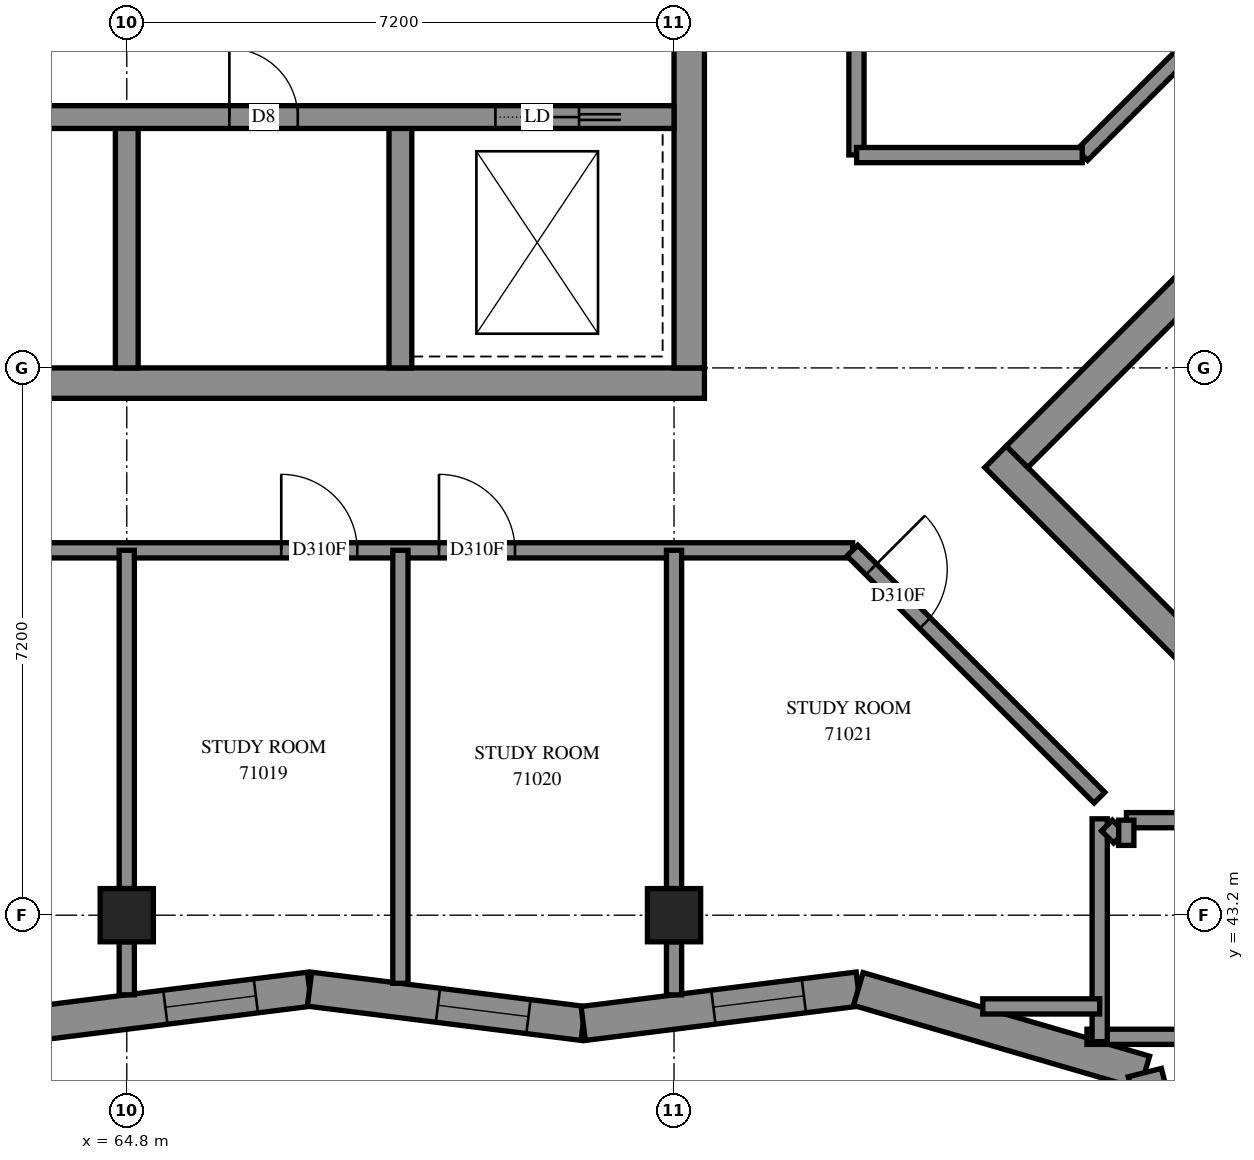
"""IFC4 building model, lengths in metres.
Left out: names, types, materials, properties, quantities, classifications, styles, units other than length and angle.
Written with IfcOpenShell. Run it as: python <this file> out.ifc"""

import sys

from ifc_helpers import new_model, si_unit, direction, frame, frame_2d, origin, origin_2d, place, context, subcontext, project, spatial, polyline, rectangle, outline, extrude, element, fill, save


model = new_model("IFC4")
c1 = context("Model", 3, precision=1e-05, world=origin(), true_north=direction((0.0, 1.0)))
c2 = subcontext(c1, "Body", "Model", "MODEL_VIEW")
j1 = project(units=[si_unit("LENGTHUNIT", "METRE"), si_unit("PLANEANGLEUNIT", "RADIAN")], contexts=[c1])
p1 = place(None, origin())
s1 = spatial("IfcSite", under=j1, at=p1, CompositionType="ELEMENT")
p2 = place(p1, origin())
s2 = spatial("IfcBuilding", under=s1, at=p2, CompositionType="ELEMENT")
p3 = place(p2, frame((0.0, 0.0, 260.8)))
s3 = spatial("IfcBuildingStorey", under=s2, at=p3, CompositionType="ELEMENT", Elevation=260.8)
for number, where, z_axis, x_axis in (
    (1, (64.8, 43.2, 0.0), (0.0, 0.0, 1.0), (1.0, 0.0, 0.0)),
    (2, (72.0, 43.2, 0.0), (0.0, 0.0, 1.0), (1.0, 0.0, 0.0)),
):
    element("IfcColumn", number, at=place(p3, frame(where, z_axis=z_axis, x_axis=x_axis)), inside=s3, PredefinedType="COLUMN", context=c2, shape_type="SweptSolid", body=[
        extrude(rectangle(XDim=0.7, YDim=0.7, at=origin_2d()), origin(), (0.0, 0.0, 1.0), 3.1),
    ])
p4 = place(p3, frame((57.2, 50.2, -0.3), z_axis=(0.0, 0.0, 1.0), x_axis=(1.0, 0.0, 0.0)))
e3 = element("IfcWall", 3, at=p4, inside=s3, PredefinedType="SHEAR", context=c2, shape_type="SweptSolid", body=[
    extrude(rectangle(XDim=15.2, YDim=0.4, at=frame_2d((7.6, 0.0))), origin(), (0.0, 0.0, 1.0), 2.7),
])
p5 = place(p3, frame((72.2, 50.4, -0.3), z_axis=(0.0, 0.0, 1.0), x_axis=(0.0, 1.0, 0.0)))
e4 = element("IfcWall", 4, at=p5, inside=s3, PredefinedType="SHEAR", context=c2, shape_type="SweptSolid", body=[
    extrude(rectangle(XDim=14.4, YDim=0.4, at=frame_2d((7.2, 0.0))), origin(), (0.0, 0.0, 1.0), 2.7),
])
p6 = place(p5, frame((4.55, 0.0, 0.3)))
e5 = element("IfcOpeningElement", 5, at=p6, cuts=e4, PredefinedType="OPENING", context=c2, shape_type="SweptSolid", body=[
    extrude(rectangle(XDim=1.1, YDim=2.1, at=frame_2d((0.55, 1.05))), frame((0.0, 0.21, 0.0), z_axis=(0.0, -1.0, 0.0), x_axis=(1.0, 0.0, 0.0)), (0.0, 0.0, 1.0), 0.42),
])
p7 = place(p5, frame((11.35, 0.0, 0.3)))
e6 = element("IfcOpeningElement", 6, at=p7, cuts=e4, PredefinedType="OPENING", context=c2, shape_type="SweptSolid", body=[
    extrude(rectangle(XDim=1.1, YDim=2.1, at=frame_2d((0.55, 1.05))), frame((0.0, 0.21, 0.0), z_axis=(0.0, -1.0, 0.0), x_axis=(1.0, 0.0, 0.0)), (0.0, 0.0, 1.0), 0.42),
])
for number, where, z_axis, x_axis in (
    (7, (64.8, 50.4, 0.0), (0.0, 0.0, 1.0), (0.0, 1.0, 0.0)),
    (8, (68.4, 50.4, 0.0), (0.0, 0.0, 1.0), (0.0, 1.0, 0.0)),
):
    element("IfcWall", number, at=place(p3, frame(where, z_axis=z_axis, x_axis=x_axis)), inside=s3, PredefinedType="SOLIDWALL", context=c2, shape_type="SweptSolid", body=[
        extrude(rectangle(XDim=3.3, YDim=0.3, at=frame_2d((1.65, 0.0))), origin(), (0.0, 0.0, 1.0), 3.1),
    ])
p8 = place(p3, frame((57.6, 53.7, 0.0), z_axis=(0.0, 0.0, 1.0), x_axis=(1.0, 0.0, 0.0)))
e9 = element("IfcWall", 9, at=p8, inside=s3, PredefinedType="SOLIDWALL", context=c2, shape_type="SweptSolid", body=[
    extrude(rectangle(XDim=14.4, YDim=0.3, at=frame_2d((7.2, 0.0))), origin(), (0.0, 0.0, 1.0), 3.1),
])
p9 = place(p8, frame((1.35, 0.0, 0.0)))
e10 = element("IfcOpeningElement", 10, at=p9, cuts=e9, PredefinedType="OPENING", context=c2, shape_type="SweptSolid", body=[
    extrude(rectangle(XDim=0.9, YDim=2.1, at=frame_2d((0.45, 1.05))), frame((0.0, 0.16, 0.0), z_axis=(0.0, -1.0, 0.0), x_axis=(1.0, 0.0, 0.0)), (0.0, 0.0, 1.0), 0.32),
])
p10 = place(p8, frame((4.95, 0.0, 0.0)))
e11 = element("IfcOpeningElement", 11, at=p10, cuts=e9, PredefinedType="OPENING", context=c2, shape_type="SweptSolid", body=[
    extrude(rectangle(XDim=0.9, YDim=2.1, at=frame_2d((0.45, 1.05))), frame((0.0, 0.16, 0.0), z_axis=(0.0, -1.0, 0.0), x_axis=(1.0, 0.0, 0.0)), (0.0, 0.0, 1.0), 0.32),
])
p11 = place(p8, frame((8.55, 0.0, 0.0)))
e12 = element("IfcOpeningElement", 12, at=p11, cuts=e9, PredefinedType="OPENING", context=c2, shape_type="SweptSolid", body=[
    extrude(rectangle(XDim=0.9, YDim=2.1, at=frame_2d((0.45, 1.05))), frame((0.0, 0.16, 0.0), z_axis=(0.0, -1.0, 0.0), x_axis=(1.0, 0.0, 0.0)), (0.0, 0.0, 1.0), 0.32),
])
p12 = place(p8, frame((12.05, 0.0, 0.0)))
e13 = element("IfcOpeningElement", 13, at=p12, cuts=e9, PredefinedType="OPENING", context=c2, shape_type="SweptSolid", body=[
    extrude(rectangle(XDim=1.1, YDim=2.1, at=frame_2d((0.55, 1.05))), frame((0.0, 0.16, 0.0), z_axis=(0.0, -1.0, 0.0), x_axis=(1.0, 0.0, 0.0)), (0.0, 0.0, 1.0), 0.32),
])
p13 = place(p3, frame((76.23, 49.231, -0.3), z_axis=(0.0, 0.0, 1.0), x_axis=(0.7071034917, -0.7071100706, 0.0)))
e14 = element("IfcWall", 14, at=p13, inside=s3, PredefinedType="SHEAR", context=c2, shape_type="SweptSolid", body=[
    extrude(rectangle(XDim=15.2, YDim=0.4, at=frame_2d((7.6, 0.0))), origin(), (0.0, 0.0, 1.0), 2.7),
])
p14 = place(p3, frame((76.513, 49.231, -0.3), z_axis=(0.0, 0.0, 1.0), x_axis=(0.7071067812, 0.7071067812, 0.0)))
e15 = element("IfcWall", 15, at=p14, inside=s3, PredefinedType="SHEAR", context=c2, shape_type="SweptSolid", body=[
    extrude(rectangle(XDim=14.4, YDim=0.4, at=frame_2d((7.2, 0.0))), origin(), (0.0, 0.0, 1.0), 2.7),
])
p15 = place(p14, frame((4.55, 0.0, 0.3)))
e16 = element("IfcOpeningElement", 16, at=p15, cuts=e15, PredefinedType="OPENING", context=c2, shape_type="SweptSolid", body=[
    extrude(rectangle(XDim=1.1, YDim=2.1, at=frame_2d((0.55, 1.05))), frame((0.0, 0.21, 0.0), z_axis=(0.0, -1.0, 0.0), x_axis=(1.0, 0.0, 0.0)), (0.0, 0.0, 1.0), 0.42),
])
p16 = place(p14, frame((11.35, 0.0, 0.3)))
e17 = element("IfcOpeningElement", 17, at=p16, cuts=e15, PredefinedType="OPENING", context=c2, shape_type="SweptSolid", body=[
    extrude(rectangle(XDim=1.1, YDim=2.1, at=frame_2d((0.55, 1.05))), frame((0.0, 0.21, 0.0), z_axis=(0.0, -1.0, 0.0), x_axis=(1.0, 0.0, 0.0)), (0.0, 0.0, 1.0), 0.42),
])
p17 = place(p3, frame((63.603, 41.776, 0.0), z_axis=(0.0, 0.0, 1.0), x_axis=(0.9922473228, 0.1242789221, 0.0)))
e18 = element("IfcWall", 18, at=p17, inside=s3, PredefinedType="SOLIDWALL", context=c2, shape_type="SweptSolid", body=[
    extrude(outline(polyline([(-0.028, -0.225), (3.601, -0.225), (3.657, 0.225), (0.028, 0.225), (-0.028, -0.225)])), origin(), (0.0, 0.0, 1.0), 3.1),
])
p18 = place(p17, frame((1.717, 0.0, 0.45)))
e19 = element("IfcOpeningElement", 19, at=p18, cuts=e18, PredefinedType="OPENING", context=c2, shape_type="SweptSolid", body=[
    extrude(rectangle(XDim=1.2, YDim=2.55, at=frame_2d((0.6, 1.275))), frame((0.0, 0.235, 0.0), z_axis=(0.0, -1.0, 0.0), x_axis=(1.0, 0.0, 0.0)), (0.0, 0.0, 1.0), 0.47),
])
p19 = place(p3, frame((67.204, 42.227, 0.0), z_axis=(0.0, 0.0, 1.0), x_axis=(0.9922477484, -0.124275524, 0.0)))
e20 = element("IfcWall", 20, at=p19, inside=s3, PredefinedType="SOLIDWALL", context=c2, shape_type="SweptSolid", body=[
    extrude(outline(polyline([(0.028, -0.225), (3.657, -0.225), (3.601, 0.225), (-0.028, 0.225), (0.028, -0.225)])), origin(), (0.0, 0.0, 1.0), 3.1),
])
p20 = place(p19, frame((1.703, 0.0, 0.45)))
e21 = element("IfcOpeningElement", 21, at=p20, cuts=e20, PredefinedType="OPENING", context=c2, shape_type="SweptSolid", body=[
    extrude(rectangle(XDim=1.2, YDim=2.55, at=frame_2d((0.6, 1.275))), frame((0.0, 0.235, 0.0), z_axis=(0.0, -1.0, 0.0), x_axis=(1.0, 0.0, 0.0)), (0.0, 0.0, 1.0), 0.47),
])
p21 = place(p3, frame((70.805, 41.776, 0.0), z_axis=(0.0, 0.0, 1.0), x_axis=(0.9922504354, 0.124254068, 0.0)))
e22 = element("IfcWall", 22, at=p21, inside=s3, PredefinedType="SOLIDWALL", context=c2, shape_type="SweptSolid", body=[
    extrude(outline(polyline([(-0.028, -0.225), (3.601, -0.225), (3.694, 0.225), (0.028, 0.225), (-0.028, -0.225)])), origin(), (0.0, 0.0, 1.0), 3.1),
])
p22 = place(p21, frame((1.726, 0.0, 0.45)))
e23 = element("IfcOpeningElement", 23, at=p22, cuts=e22, PredefinedType="OPENING", context=c2, shape_type="SweptSolid", body=[
    extrude(rectangle(XDim=1.2, YDim=2.55, at=frame_2d((0.6, 1.275))), frame((0.0, 0.235, 0.0), z_axis=(0.0, -1.0, 0.0), x_axis=(1.0, 0.0, 0.0)), (0.0, 0.0, 1.0), 0.47),
])
p23 = place(p3, frame((74.424, 42.229, 0.0), z_axis=(0.0, 0.0, 1.0), x_axis=(0.9599486399, -0.2801760317, 0.0)))
e24 = element("IfcWall", 24, at=p23, inside=s3, PredefinedType="SOLIDWALL", context=c2, shape_type="SweptSolid", body=[
    extrude(outline(polyline([(0.047, -0.225), (3.798, -0.225), (4.055, 0.225), (-0.047, 0.225), (0.047, -0.225)])), origin(), (0.0, 0.0, 1.0), 3.1),
])
p24 = place(p3, frame((78.194, 41.129, 0.0), z_axis=(0.0, 0.0, 1.0), x_axis=(0.2448760065, -0.9695544036, 0.0)))
e25 = element("IfcWall", 25, at=p24, inside=s3, PredefinedType="SOLIDWALL", context=c2, shape_type="SweptSolid", body=[
    extrude(outline(polyline([(0.129, -0.225), (4.812, -0.225), (4.555, 0.225), (-0.129, 0.225), (0.129, -0.225)])), origin(), (0.0, 0.0, 1.0), 3.1),
])
p25 = place(p24, frame((2.366, 0.0, 0.45)))
e26 = element("IfcOpeningElement", 26, at=p25, cuts=e25, PredefinedType="OPENING", context=c2, shape_type="SweptSolid", body=[
    extrude(rectangle(XDim=1.2, YDim=2.55, at=frame_2d((0.6, 1.275))), frame((0.0, 0.235, 0.0), z_axis=(0.0, -1.0, 0.0), x_axis=(1.0, 0.0, 0.0)), (0.0, 0.0, 1.0), 0.47),
])
p26 = place(p3, frame((55.2, 48.0, 0.0), z_axis=(0.0, 0.0, 1.0), x_axis=(1.0, 0.0, 0.0)))
e27 = element("IfcWall", 27, at=p26, inside=s3, PredefinedType="PARTITIONING", context=c2, shape_type="SweptSolid", body=[
    extrude(rectangle(XDim=19.15, YDim=0.2, at=frame_2d((9.575, 0.0))), origin(), (0.0, 0.0, 1.0), 3.1),
])
p27 = place(p26, frame((6.343, 0.0, 0.0)))
e28 = element("IfcOpeningElement", 28, at=p27, cuts=e27, PredefinedType="OPENING", context=c2, shape_type="SweptSolid", body=[
    extrude(rectangle(XDim=0.9, YDim=2.1, at=frame_2d((0.45, 1.05))), frame((0.0, 0.11, 0.0), z_axis=(0.0, -1.0, 0.0), x_axis=(1.0, 0.0, 0.0)), (0.0, 0.0, 1.0), 0.22),
])
p28 = place(p26, frame((11.633, 0.0, 0.0)))
e29 = element("IfcOpeningElement", 29, at=p28, cuts=e27, PredefinedType="OPENING", context=c2, shape_type="SweptSolid", body=[
    extrude(rectangle(XDim=1.0, YDim=2.1, at=frame_2d((0.5, 1.05))), frame((0.0, 0.11, 0.0), z_axis=(0.0, -1.0, 0.0), x_axis=(1.0, 0.0, 0.0)), (0.0, 0.0, 1.0), 0.22),
])
p29 = place(p26, frame((13.707, 0.0, 0.0)))
e30 = element("IfcOpeningElement", 30, at=p29, cuts=e27, PredefinedType="OPENING", context=c2, shape_type="SweptSolid", body=[
    extrude(rectangle(XDim=1.0, YDim=2.1, at=frame_2d((0.5, 1.05))), frame((0.0, 0.11, 0.0), z_axis=(0.0, -1.0, 0.0), x_axis=(1.0, 0.0, 0.0)), (0.0, 0.0, 1.0), 0.22),
])
p30 = place(p3, frame((68.4, 42.304, 0.0), z_axis=(0.0, 0.0, 1.0), x_axis=(0.0, 1.0, 0.0)))
e31 = element("IfcWall", 31, at=p30, inside=s3, PredefinedType="PARTITIONING", context=c2, shape_type="SweptSolid", body=[
    extrude(rectangle(XDim=5.696, YDim=0.2, at=frame_2d((2.848, 0.0))), origin(), (0.0, 0.0, 1.0), 3.1),
])
p31 = place(p3, frame((74.4, 53.202, 0.0), z_axis=(0.0, 0.0, 1.0), x_axis=(0.0, 1.0, 0.0)))
e32 = element("IfcWall", 32, at=p31, inside=s3, PredefinedType="PARTITIONING", context=c2, shape_type="SweptSolid", body=[
    extrude(rectangle(XDim=5.198, YDim=0.2, at=frame_2d((2.599, 0.0))), origin(), (0.0, 0.0, 1.0), 3.1),
])
p32 = place(p3, frame((74.347, 47.997, 0.0), z_axis=(0.0, 0.0, 1.0), x_axis=(0.7071067812, -0.7071067812, 0.0)))
e33 = element("IfcWall", 33, at=p32, inside=s3, PredefinedType="PARTITIONING", context=c2, shape_type="SweptSolid", body=[
    extrude(rectangle(XDim=4.596, YDim=0.2, at=frame_2d((2.298, 0.0))), origin(), (0.0, 0.0, 1.0), 3.1),
])
p33 = place(p32, frame((0.35, 0.0, 0.0)))
e34 = element("IfcOpeningElement", 34, at=p33, cuts=e33, PredefinedType="OPENING", context=c2, shape_type="SweptSolid", body=[
    extrude(rectangle(XDim=1.0, YDim=2.1, at=frame_2d((0.5, 1.05))), frame((0.0, 0.11, 0.0), z_axis=(0.0, -1.0, 0.0), x_axis=(1.0, 0.0, 0.0)), (0.0, 0.0, 1.0), 0.22),
])
for number, where, z_axis, x_axis in (
    (35, (64.8, 43.55, 0.0), (0.0, 0.0, 1.0), (0.0, 1.0, 0.0)),
    (36, (72.0, 43.55, 0.0), (0.0, 0.0, 1.0), (0.0, 1.0, 0.0)),
):
    element("IfcWall", number, at=place(p3, frame(where, z_axis=z_axis, x_axis=x_axis)), inside=s3, PredefinedType="PARTITIONING", context=c2, shape_type="SweptSolid", body=[
        extrude(rectangle(XDim=4.45, YDim=0.2, at=frame_2d((2.225, 0.0))), origin(), (0.0, 0.0, 1.0), 3.1),
    ])
p34 = place(p3, frame((77.37, 53.2, 0.0), z_axis=(0.0, 0.0, 1.0), x_axis=(0.7071067812, 0.7071067812, 0.0)))
e37 = element("IfcWall", 37, at=p34, inside=s3, PredefinedType="PARTITIONING", context=c2, shape_type="SweptSolid", body=[
    extrude(rectangle(XDim=3.437, YDim=0.2, at=frame_2d((1.718, 0.0))), origin(), (0.0, 0.0, 1.0), 3.1),
])
p35 = place(p3, frame((77.433, 41.6, 0.0), z_axis=(0.0, 0.0, 1.0), x_axis=(1.0, 0.0, 0.0)))
e38 = element("IfcWall", 38, at=p35, inside=s3, PredefinedType="PARTITIONING", context=c2, shape_type="SweptSolid", body=[
    extrude(rectangle(XDim=3.035, YDim=0.2, at=frame_2d((1.518, 0.0))), origin(), (0.0, 0.0, 1.0), 3.1),
])
p36 = place(p3, frame((74.402, 53.2, 0.0), z_axis=(0.0, 0.0, 1.0), x_axis=(1.0, 0.0, 0.0)))
e39 = element("IfcWall", 39, at=p36, inside=s3, PredefinedType="PARTITIONING", context=c2, shape_type="SweptSolid", body=[
    extrude(rectangle(XDim=2.968, YDim=0.2, at=frame_2d((1.484, 0.0))), origin(), (0.0, 0.0, 1.0), 3.1),
])
p37 = place(p3, frame((77.6, 41.536, 0.0), z_axis=(0.0, 0.0, 1.0), x_axis=(0.0, 1.0, 0.0)))
e40 = element("IfcWall", 40, at=p37, inside=s3, PredefinedType="PARTITIONING", context=c2, shape_type="SweptSolid", body=[
    extrude(rectangle(XDim=2.932, YDim=0.2, at=frame_2d((1.466, 0.0))), origin(), (0.0, 0.0, 1.0), 3.1),
])
p38 = place(p3, frame((77.952, 44.45, 0.0), z_axis=(0.0, 0.0, 1.0), x_axis=(1.0, 0.0, 0.0)))
e41 = element("IfcWall", 41, at=p38, inside=s3, PredefinedType="PARTITIONING", context=c2, shape_type="SweptSolid", body=[
    extrude(rectangle(XDim=2.498, YDim=0.2, at=frame_2d((1.249, 0.0))), origin(), (0.0, 0.0, 1.0), 3.1),
])
p39 = place(p3, frame((76.062, 42.0, 0.0), z_axis=(0.0, 0.0, 1.0), x_axis=(1.0, 0.0, 0.0)))
e42 = element("IfcWall", 42, at=p39, inside=s3, PredefinedType="PARTITIONING", context=c2, shape_type="SweptSolid", body=[
    extrude(rectangle(XDim=1.538, YDim=0.2, at=frame_2d((0.769, 0.0))), origin(), (0.0, 0.0, 1.0), 3.1),
])
p40 = place(p3, frame((72.0, 42.152, 0.0), z_axis=(0.0, 0.0, 1.0), x_axis=(0.0, 1.0, 0.0)))
e43 = element("IfcWall", 43, at=p40, inside=s3, PredefinedType="PARTITIONING", context=c2, shape_type="SweptSolid", body=[
    extrude(rectangle(XDim=0.698, YDim=0.2, at=frame_2d((0.349, 0.0))), origin(), (0.0, 0.0, 1.0), 3.1),
])
p41 = place(p3, frame((64.8, 42.152, 0.0), z_axis=(0.0, 0.0, 1.0), x_axis=(0.0, 1.0, 0.0)))
e44 = element("IfcWall", 44, at=p41, inside=s3, PredefinedType="PARTITIONING", context=c2, shape_type="SweptSolid", body=[
    extrude(rectangle(XDim=0.698, YDim=0.2, at=frame_2d((0.349, 0.0))), origin(), (0.0, 0.0, 1.0), 3.1),
])
p42 = place(p3, frame((77.695, 44.38, 0.0), z_axis=(0.0, 0.0, 1.0), x_axis=(0.707329037, -0.7068844555, 0.0)))
e45 = element("IfcWall", 45, at=p42, inside=s3, PredefinedType="PARTITIONING", context=c2, shape_type="SweptSolid", body=[
    extrude(rectangle(XDim=0.225, YDim=0.2, at=frame_2d((0.112, 0.0))), origin(), (0.0, 0.0, 1.0), 3.1),
])
p43 = place(p3, frame((77.95, 44.118, 0.0), z_axis=(0.0, 0.0, 1.0), x_axis=(0.0, 1.0, 0.0)))
e46 = element("IfcWall", 46, at=p43, inside=s3, PredefinedType="PARTITIONING", context=c2, shape_type="SweptSolid", body=[
    extrude(rectangle(XDim=0.332, YDim=0.2, at=frame_2d((0.166, 0.0))), origin(), (0.0, 0.0, 1.0), 3.1),
])
p44 = place(p18, origin())
e47 = element("IfcWindow", 47, at=p44, inside=s3, PartitioningType="SINGLE_PANEL", PredefinedType="WINDOW", context=c2, shape_type="SweptSolid", body=[
    extrude(rectangle(XDim=1.2, YDim=2.55, at=frame_2d((0.6, 1.275))), frame((0.0, 0.205, 0.0), z_axis=(0.0, -1.0, 0.0), x_axis=(1.0, 0.0, 0.0)), (0.0, 0.0, 1.0), 0.06),
])
fill(e19, e47)
p45 = place(p20, origin())
e48 = element("IfcWindow", 48, at=p45, inside=s3, PartitioningType="SINGLE_PANEL", PredefinedType="WINDOW", context=c2, shape_type="SweptSolid", body=[
    extrude(rectangle(XDim=1.2, YDim=2.55, at=frame_2d((0.6, 1.275))), frame((0.0, 0.205, 0.0), z_axis=(0.0, -1.0, 0.0), x_axis=(1.0, 0.0, 0.0)), (0.0, 0.0, 1.0), 0.06),
])
fill(e21, e48)
p46 = place(p22, origin())
e49 = element("IfcWindow", 49, at=p46, inside=s3, PartitioningType="SINGLE_PANEL", PredefinedType="WINDOW", context=c2, shape_type="SweptSolid", body=[
    extrude(rectangle(XDim=1.2, YDim=2.55, at=frame_2d((0.6, 1.275))), frame((0.0, 0.205, 0.0), z_axis=(0.0, -1.0, 0.0), x_axis=(1.0, 0.0, 0.0)), (0.0, 0.0, 1.0), 0.06),
])
fill(e23, e49)
p47 = place(p11, origin())
e50 = element("IfcDoor", 50, at=p47, inside=s3, OperationType="SINGLE_SWING_LEFT", PredefinedType="DOOR", context=c2, shape_type="SweptSolid", body=[
    extrude(rectangle(XDim=0.9, YDim=2.1, at=frame_2d((0.45, 1.05))), frame((0.0, 0.025, 0.0), z_axis=(0.0, -1.0, 0.0), x_axis=(1.0, 0.0, 0.0)), (0.0, 0.0, 1.0), 0.05),
])
fill(e12, e50)
p48 = place(p12, origin())
e51 = element("IfcDoor", 51, at=p48, inside=s3, OperationType="SLIDING_TO_RIGHT", PredefinedType="DOOR", context=c2, shape_type="SweptSolid", body=[
    extrude(rectangle(XDim=1.1, YDim=2.1, at=frame_2d((0.55, 1.05))), frame((0.0, 0.025, 0.0), z_axis=(0.0, -1.0, 0.0), x_axis=(1.0, 0.0, 0.0)), (0.0, 0.0, 1.0), 0.05),
])
fill(e13, e51)
p49 = place(p28, origin())
e52 = element("IfcDoor", 52, at=p49, inside=s3, OperationType="SINGLE_SWING_LEFT", PredefinedType="DOOR", context=c2, shape_type="SweptSolid", body=[
    extrude(rectangle(XDim=1.0, YDim=2.1, at=frame_2d((0.5, 1.05))), frame((0.0, 0.025, 0.0), z_axis=(0.0, -1.0, 0.0), x_axis=(1.0, 0.0, 0.0)), (0.0, 0.0, 1.0), 0.05),
])
fill(e29, e52)
p50 = place(p29, origin())
e53 = element("IfcDoor", 53, at=p50, inside=s3, OperationType="SINGLE_SWING_RIGHT", PredefinedType="DOOR", context=c2, shape_type="SweptSolid", body=[
    extrude(rectangle(XDim=1.0, YDim=2.1, at=frame_2d((0.5, 1.05))), frame((0.0, 0.025, 0.0), z_axis=(0.0, -1.0, 0.0), x_axis=(1.0, 0.0, 0.0)), (0.0, 0.0, 1.0), 0.05),
])
fill(e30, e53)
p51 = place(p33, origin())
e54 = element("IfcDoor", 54, at=p51, inside=s3, OperationType="SINGLE_SWING_LEFT", PredefinedType="DOOR", context=c2, shape_type="SweptSolid", body=[
    extrude(rectangle(XDim=1.0, YDim=2.1, at=frame_2d((0.5, 1.05))), frame((0.0, 0.025, 0.0), z_axis=(0.0, -1.0, 0.0), x_axis=(1.0, 0.0, 0.0)), (0.0, 0.0, 1.0), 0.05),
])
fill(e34, e54)
save(model, sys.argv[1])
